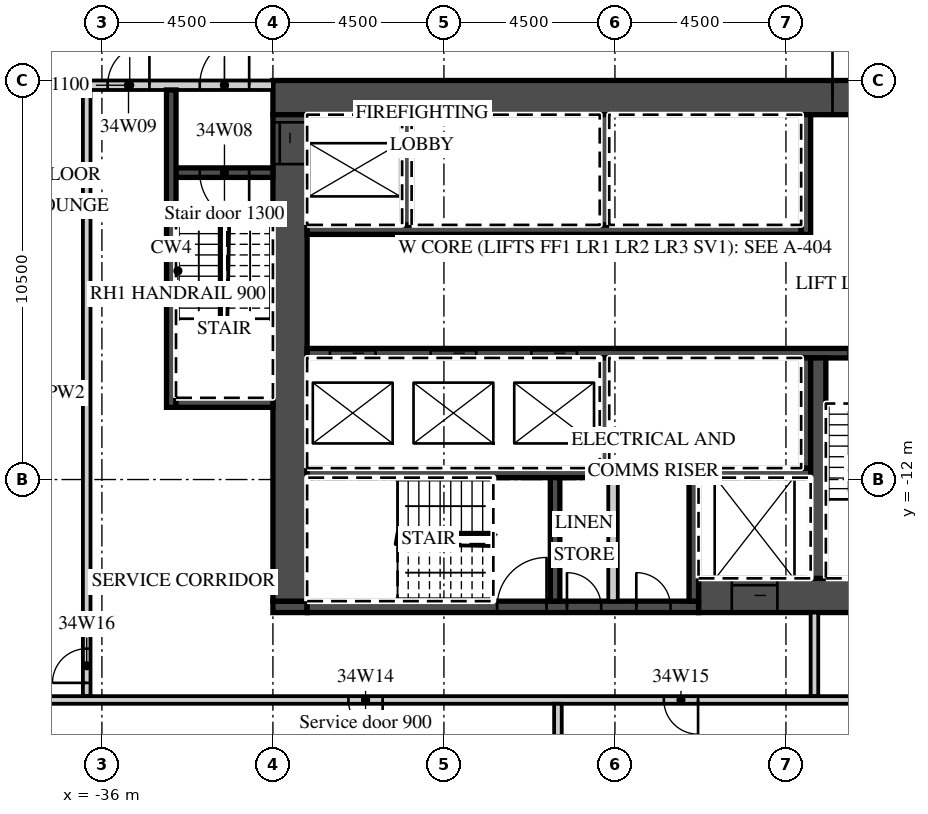
"""IFC4 building model, lengths in metres.
Left out: names, types, materials, properties, quantities, classifications, styles, units other than length and angle.
Written with IfcOpenShell. Run it as: python <this file> out.ifc"""

import sys

from ifc_helpers import new_model, si_unit, direction, frame, frame_2d, origin, place, context, subcontext, project, spatial, rectangle, extrude, element, fill, save


model = new_model("IFC4")
c1 = context("Model", 3, precision=1e-05, world=origin(), true_north=direction((0.0, 1.0)))
c2 = subcontext(c1, "Body", "Model", "MODEL_VIEW")
j1 = project(units=[si_unit("LENGTHUNIT", "METRE"), si_unit("PLANEANGLEUNIT", "RADIAN")], contexts=[c1])
p1 = place(None, origin())
s1 = spatial("IfcSite", under=j1, at=p1, CompositionType="ELEMENT")
p2 = place(p1, origin())
s2 = spatial("IfcBuilding", under=s1, at=p2, CompositionType="ELEMENT")
p3 = place(p2, frame((0.0, 0.0, 147.1)))
s3 = spatial("IfcBuildingStorey", under=s2, at=p3, CompositionType="ELEMENT", Elevation=147.1)
p4 = place(p3, frame((-40.753, 13.872, 0.0), z_axis=(0.0, 0.0, 1.0), x_axis=(0.095843327381, -0.995396431878, 0.0)))
e1 = element("IfcWall", 1, at=p4, inside=s3, PredefinedType="SOLIDWALL", context=c2, shape_type="SweptSolid", body=[
    extrude(rectangle(XDim=35.0, YDim=0.45, at=frame_2d((17.5, 0.0))), origin(), (0.0, 0.0, 1.0), 3.0),
])
p5 = place(p4, frame((4.277, 0.0, 0.45)))
e2 = element("IfcOpeningElement", 2, at=p5, cuts=e1, PredefinedType="OPENING", context=c2, shape_type="SweptSolid", body=[
    extrude(rectangle(XDim=3.3, YDim=2.25, at=frame_2d((1.65, 1.125))), frame((0.0, 0.235, 0.0), z_axis=(0.0, -1.0, 0.0), x_axis=(1.0, 0.0, 0.0)), (0.0, 0.0, 1.0), 0.47),
])
p6 = place(p4, frame((8.798, 0.0, 0.45)))
e3 = element("IfcOpeningElement", 3, at=p6, cuts=e1, PredefinedType="OPENING", context=c2, shape_type="SweptSolid", body=[
    extrude(rectangle(XDim=3.3, YDim=2.25, at=frame_2d((1.65, 1.125))), frame((0.0, 0.235, 0.0), z_axis=(0.0, -1.0, 0.0), x_axis=(1.0, 0.0, 0.0)), (0.0, 0.0, 1.0), 0.47),
])
p7 = place(p3, frame((-31.5, -1.95, 0.0), z_axis=(0.0, 0.0, 1.0), x_axis=(1.0, 0.0, 0.0)))
e4 = element("IfcWall", 4, at=p7, inside=s3, PredefinedType="SHEAR", context=c2, shape_type="SweptSolid", body=[
    extrude(rectangle(XDim=18.0, YDim=0.9, at=frame_2d((9.0, 0.0))), origin(), (0.0, 0.0, 1.0), 3.0),
])
p8 = place(p7, frame((14.725, 0.0, 0.0)))
e5 = element("IfcOpeningElement", 5, at=p8, cuts=e4, PredefinedType="OPENING", context=c2, shape_type="SweptSolid", body=[
    extrude(rectangle(XDim=1.8, YDim=2.1, at=frame_2d((0.9, 1.05))), frame((0.0, 0.46, 0.0), z_axis=(0.0, -1.0, 0.0), x_axis=(1.0, 0.0, 0.0)), (0.0, 0.0, 1.0), 0.92),
])
p9 = place(p3, frame((-20.3, -15.05, 0.0), z_axis=(0.0, 0.0, 1.0), x_axis=(1.0, 0.0, 0.0)))
e6 = element("IfcWall", 6, at=p9, inside=s3, PredefinedType="SHEAR", context=c2, shape_type="SweptSolid", body=[
    extrude(rectangle(XDim=6.8, YDim=0.9, at=frame_2d((3.4, 0.0))), origin(), (0.0, 0.0, 1.0), 3.0),
])
p10 = place(p9, frame((0.875, 0.0, 0.0)))
e7 = element("IfcOpeningElement", 7, at=p10, cuts=e6, PredefinedType="OPENING", context=c2, shape_type="SweptSolid", body=[
    extrude(rectangle(XDim=1.2, YDim=2.1, at=frame_2d((0.6, 1.05))), frame((0.0, 0.46, 0.0), z_axis=(0.0, -1.0, 0.0), x_axis=(1.0, 0.0, 0.0)), (0.0, 0.0, 1.0), 0.92),
])
p11 = place(p3, frame((-31.5, -15.35, 0.0), z_axis=(0.0, 0.0, 1.0), x_axis=(1.0, 0.0, 0.0)))
e8 = element("IfcWall", 8, at=p11, inside=s3, PredefinedType="SHEAR", context=c2, shape_type="SweptSolid", body=[
    extrude(rectangle(XDim=0.9, YDim=0.3, at=frame_2d((0.45, 0.0))), origin(), (0.0, 0.0, 1.0), 3.0),
])
p12 = place(p3, frame((-30.6, -15.35, 0.0), z_axis=(0.0, 0.0, 1.0), x_axis=(1.0, 0.0, 0.0)))
e9 = element("IfcWall", 9, at=p12, inside=s3, PredefinedType="SHEAR", context=c2, shape_type="SweptSolid", body=[
    extrude(rectangle(XDim=10.3, YDim=0.3, at=frame_2d((5.15, 0.0))), origin(), (0.0, 0.0, 1.0), 3.0),
])
p13 = place(p12, frame((5.0, 0.0, 0.0)))
e10 = element("IfcOpeningElement", 10, at=p13, cuts=e9, PredefinedType="OPENING", context=c2, shape_type="SweptSolid", body=[
    extrude(rectangle(XDim=1.3, YDim=2.1, at=frame_2d((0.65, 1.05))), frame((0.0, 0.16, 0.0), z_axis=(0.0, -1.0, 0.0), x_axis=(1.0, 0.0, 0.0)), (0.0, 0.0, 1.0), 0.32),
])
p14 = place(p12, frame((6.837, 0.0, 0.0)))
e11 = element("IfcOpeningElement", 11, at=p14, cuts=e9, PredefinedType="OPENING", context=c2, shape_type="SweptSolid", body=[
    extrude(rectangle(XDim=0.9, YDim=2.1, at=frame_2d((0.45, 1.05))), frame((0.0, 0.16, 0.0), z_axis=(0.0, -1.0, 0.0), x_axis=(1.0, 0.0, 0.0)), (0.0, 0.0, 1.0), 0.32),
])
p15 = place(p12, frame((8.663, 0.0, 0.0)))
e12 = element("IfcOpeningElement", 12, at=p15, cuts=e9, PredefinedType="OPENING", context=c2, shape_type="SweptSolid", body=[
    extrude(rectangle(XDim=0.9, YDim=2.1, at=frame_2d((0.45, 1.05))), frame((0.0, 0.16, 0.0), z_axis=(0.0, -1.0, 0.0), x_axis=(1.0, 0.0, 0.0)), (0.0, 0.0, 1.0), 0.32),
])
p16 = place(p3, frame((-31.05, -15.2, 0.0), z_axis=(0.0, 0.0, 1.0), x_axis=(0.0, 1.0, 0.0)))
e13 = element("IfcWall", 13, at=p16, inside=s3, PredefinedType="SHEAR", context=c2, shape_type="SweptSolid", body=[
    extrude(rectangle(XDim=12.8, YDim=0.9, at=frame_2d((6.4, 0.0))), origin(), (0.0, 0.0, 1.0), 3.0),
])
p17 = place(p16, frame((11.5, 0.0, 0.0)))
e14 = element("IfcOpeningElement", 14, at=p17, cuts=e13, PredefinedType="OPENING", context=c2, shape_type="SweptSolid", body=[
    extrude(rectangle(XDim=1.1, YDim=2.1, at=frame_2d((0.55, 1.05))), frame((0.0, 0.46, 0.0), z_axis=(0.0, -1.0, 0.0), x_axis=(1.0, 0.0, 0.0)), (0.0, 0.0, 1.0), 0.92),
])
p18 = place(p3, frame((-30.6, -5.425, 0.0), z_axis=(0.0, 0.0, 1.0), x_axis=(1.0, 0.0, 0.0)))
e15 = element("IfcWall", 15, at=p18, inside=s3, PredefinedType="SHEAR", context=c2, shape_type="SweptSolid", body=[
    extrude(rectangle(XDim=13.0, YDim=0.25, at=frame_2d((6.5, 0.0))), origin(), (0.0, 0.0, 1.0), 3.0),
])
p19 = place(p3, frame((-17.475, -5.55, 0.0), z_axis=(0.0, 0.0, 1.0), x_axis=(0.0, 1.0, 0.0)))
e16 = element("IfcWall", 16, at=p19, inside=s3, PredefinedType="SHEAR", context=c2, shape_type="SweptSolid", body=[
    extrude(rectangle(XDim=3.15, YDim=0.25, at=frame_2d((1.575, 0.0))), origin(), (0.0, 0.0, 1.0), 3.0),
])
for number, where, z_axis, x_axis in (
    (17, (-27.975, -5.3, 0.0), (0.0, 0.0, 1.0), (0.0, 1.0, 0.0)),
    (18, (-22.775, -5.3, 0.0), (0.0, 0.0, 1.0), (0.0, 1.0, 0.0)),
):
    element("IfcWall", number, at=place(p3, frame(where, z_axis=z_axis, x_axis=x_axis)), inside=s3, PredefinedType="SHEAR", context=c2, shape_type="SweptSolid", body=[
        extrude(rectangle(XDim=2.9, YDim=0.25, at=frame_2d((1.45, 0.0))), origin(), (0.0, 0.0, 1.0), 3.0),
    ])
p20 = place(p3, frame((-30.6, -8.675, 0.0), z_axis=(0.0, 0.0, 1.0), x_axis=(1.0, 0.0, 0.0)))
e19 = element("IfcWall", 19, at=p20, inside=s3, PredefinedType="SHEAR", context=c2, shape_type="SweptSolid", body=[
    extrude(rectangle(XDim=16.2, YDim=0.25, at=frame_2d((8.1, 0.0))), origin(), (0.0, 0.0, 1.0), 3.0),
])
p21 = place(p20, frame((0.6, 0.0, 0.0)))
e20 = element("IfcOpeningElement", 20, at=p21, cuts=e19, PredefinedType="OPENING", context=c2, shape_type="SweptSolid", body=[
    extrude(rectangle(XDim=1.2, YDim=2.1, at=frame_2d((0.6, 1.05))), frame((0.0, 0.135, 0.0), z_axis=(0.0, -1.0, 0.0), x_axis=(1.0, 0.0, 0.0)), (0.0, 0.0, 1.0), 0.27),
])
p22 = place(p20, frame((3.25, 0.0, 0.0)))
e21 = element("IfcOpeningElement", 21, at=p22, cuts=e19, PredefinedType="OPENING", context=c2, shape_type="SweptSolid", body=[
    extrude(rectangle(XDim=1.2, YDim=2.1, at=frame_2d((0.6, 1.05))), frame((0.0, 0.135, 0.0), z_axis=(0.0, -1.0, 0.0), x_axis=(1.0, 0.0, 0.0)), (0.0, 0.0, 1.0), 0.27),
])
p23 = place(p20, frame((5.9, 0.0, 0.0)))
e22 = element("IfcOpeningElement", 22, at=p23, cuts=e19, PredefinedType="OPENING", context=c2, shape_type="SweptSolid", body=[
    extrude(rectangle(XDim=1.2, YDim=2.1, at=frame_2d((0.6, 1.05))), frame((0.0, 0.135, 0.0), z_axis=(0.0, -1.0, 0.0), x_axis=(1.0, 0.0, 0.0)), (0.0, 0.0, 1.0), 0.27),
])
p24 = place(p20, frame((14.25, 0.0, 0.0)))
e23 = element("IfcOpeningElement", 23, at=p24, cuts=e19, PredefinedType="OPENING", context=c2, shape_type="SweptSolid", body=[
    extrude(rectangle(XDim=1.3, YDim=2.1, at=frame_2d((0.65, 1.05))), frame((0.0, 0.135, 0.0), z_axis=(0.0, -1.0, 0.0), x_axis=(1.0, 0.0, 0.0)), (0.0, 0.0, 1.0), 0.27),
])
p25 = place(p3, frame((-30.6, -11.825, 0.0), z_axis=(0.0, 0.0, 1.0), x_axis=(1.0, 0.0, 0.0)))
e24 = element("IfcWall", 24, at=p25, inside=s3, PredefinedType="SHEAR", context=c2, shape_type="SweptSolid", body=[
    extrude(rectangle(XDim=13.25, YDim=0.25, at=frame_2d((6.625, 0.0))), origin(), (0.0, 0.0, 1.0), 3.0),
])
for number, where, z_axis, x_axis in (
    (25, (-17.475, -11.7, 0.0), (0.0, 0.0, 1.0), (0.0, 1.0, 0.0)),
    (26, (-22.775, -11.7, 0.0), (0.0, 0.0, 1.0), (0.0, 1.0, 0.0)),
):
    element("IfcWall", number, at=place(p3, frame(where, z_axis=z_axis, x_axis=x_axis)), inside=s3, PredefinedType="SHEAR", context=c2, shape_type="SweptSolid", body=[
        extrude(rectangle(XDim=2.9, YDim=0.25, at=frame_2d((1.45, 0.0))), origin(), (0.0, 0.0, 1.0), 3.0),
    ])
p26 = place(p3, frame((-17.15, -14.6, 0.0), z_axis=(0.0, 0.0, 1.0), x_axis=(0.0, 1.0, 0.0)))
e27 = element("IfcWall", 27, at=p26, inside=s3, PredefinedType="SHEAR", context=c2, shape_type="SweptSolid", body=[
    extrude(rectangle(XDim=5.8, YDim=0.4, at=frame_2d((2.9, 0.0))), origin(), (0.0, 0.0, 1.0), 3.0),
])
for number, where, z_axis, x_axis in (
    (28, (-20.425, -15.2, 0.0), (0.0, 0.0, 1.0), (0.0, 1.0, 0.0)),
    (29, (-24.075, -15.2, 0.0), (0.0, 0.0, 1.0), (0.0, 1.0, 0.0)),
):
    element("IfcWall", number, at=place(p3, frame(where, z_axis=z_axis, x_axis=x_axis)), inside=s3, PredefinedType="SHEAR", context=c2, shape_type="SweptSolid", body=[
        extrude(rectangle(XDim=3.25, YDim=0.25, at=frame_2d((1.625, 0.0))), origin(), (0.0, 0.0, 1.0), 3.0),
    ])
p27 = place(p3, frame((-22.55, -15.2, 0.0), z_axis=(0.0, 0.0, 1.0), x_axis=(0.0, 1.0, 0.0)))
e30 = element("IfcWall", 30, at=p27, inside=s3, PredefinedType="PARTITIONING", context=c2, shape_type="SweptSolid", body=[
    extrude(rectangle(XDim=3.25, YDim=0.25, at=frame_2d((1.625, 0.0))), origin(), (0.0, 0.0, 1.0), 3.0),
])
p28 = place(p3, frame((-39.035, -1.625, 0.0), z_axis=(0.0, 0.0, 1.0), x_axis=(1.0, 0.0, 0.0)))
e31 = element("IfcWall", 31, at=p28, inside=s3, PredefinedType="PARTITIONING", context=c2, shape_type="SweptSolid", body=[
    extrude(rectangle(XDim=7.535, YDim=0.25, at=frame_2d((3.768, 0.0))), origin(), (0.0, 0.0, 1.0), 3.0),
])
p29 = place(p28, frame((5.61, 0.0, 0.0)))
e32 = element("IfcOpeningElement", 32, at=p29, cuts=e31, PredefinedType="OPENING", context=c2, shape_type="SweptSolid", body=[
    extrude(rectangle(XDim=1.3, YDim=2.1, at=frame_2d((0.65, 1.05))), frame((0.0, 0.135, 0.0), z_axis=(0.0, -1.0, 0.0), x_axis=(1.0, 0.0, 0.0)), (0.0, 0.0, 1.0), 0.27),
])
p30 = place(p28, frame((3.185, 0.0, 0.0)))
e33 = element("IfcOpeningElement", 33, at=p30, cuts=e31, PredefinedType="OPENING", context=c2, shape_type="SweptSolid", body=[
    extrude(rectangle(XDim=1.1, YDim=2.1, at=frame_2d((0.55, 1.05))), frame((0.0, 0.135, 0.0), z_axis=(0.0, -1.0, 0.0), x_axis=(1.0, 0.0, 0.0)), (0.0, 0.0, 1.0), 0.27),
])
p31 = place(p3, frame((-34.05, -3.925, 0.0), z_axis=(0.0, 0.0, 1.0), x_axis=(1.0, 0.0, 0.0)))
e34 = element("IfcWall", 34, at=p31, inside=s3, PredefinedType="SHEAR", context=c2, shape_type="SweptSolid", body=[
    extrude(rectangle(XDim=2.55, YDim=0.25, at=frame_2d((1.275, 0.0))), origin(), (0.0, 0.0, 1.0), 3.0),
])
p32 = place(p31, frame((0.625, 0.0, 0.0)))
e35 = element("IfcOpeningElement", 35, at=p32, cuts=e34, PredefinedType="OPENING", context=c2, shape_type="SweptSolid", body=[
    extrude(rectangle(XDim=1.3, YDim=2.1, at=frame_2d((0.65, 1.05))), frame((0.0, 0.135, 0.0), z_axis=(0.0, -1.0, 0.0), x_axis=(1.0, 0.0, 0.0)), (0.0, 0.0, 1.0), 0.27),
])
p33 = place(p3, frame((-34.175, -10.1, 0.0), z_axis=(0.0, 0.0, 1.0), x_axis=(0.0, 1.0, 0.0)))
e36 = element("IfcWall", 36, at=p33, inside=s3, PredefinedType="SHEAR", context=c2, shape_type="SweptSolid", body=[
    extrude(rectangle(XDim=8.35, YDim=0.25, at=frame_2d((4.175, 0.0))), origin(), (0.0, 0.0, 1.0), 3.0),
])
p34 = place(p3, frame((-34.05, -9.975, 0.0), z_axis=(0.0, 0.0, 1.0), x_axis=(1.0, 0.0, 0.0)))
e37 = element("IfcWall", 37, at=p34, inside=s3, PredefinedType="SHEAR", context=c2, shape_type="SweptSolid", body=[
    extrude(rectangle(XDim=2.55, YDim=0.25, at=frame_2d((1.275, 0.0))), origin(), (0.0, 0.0, 1.0), 3.0),
])
p35 = place(p3, frame((-17.25, -17.7, 0.0), z_axis=(0.0, 0.0, 1.0), x_axis=(0.0, 1.0, 0.0)))
e38 = element("IfcWall", 38, at=p35, inside=s3, PredefinedType="PARTITIONING", context=c2, shape_type="SweptSolid", body=[
    extrude(rectangle(XDim=2.2, YDim=0.2, at=frame_2d((1.1, 0.0))), origin(), (0.0, 0.0, 1.0), 3.0),
])
p36 = place(p3, frame((-36.4, -17.7, 0.0), z_axis=(0.0, 0.0, 1.0), x_axis=(0.0, 1.0, 0.0)))
e39 = element("IfcWall", 39, at=p36, inside=s3, PredefinedType="PARTITIONING", context=c2, shape_type="SweptSolid", body=[
    extrude(rectangle(XDim=15.95, YDim=0.2, at=frame_2d((7.975, 0.0))), origin(), (0.0, 0.0, 1.0), 3.0),
])
p37 = place(p36, frame((0.35, 0.0, 0.0)))
e40 = element("IfcOpeningElement", 40, at=p37, cuts=e39, PredefinedType="OPENING", context=c2, shape_type="SweptSolid", body=[
    extrude(rectangle(XDim=0.9, YDim=2.1, at=frame_2d((0.45, 1.05))), frame((0.0, 0.11, 0.0), z_axis=(0.0, -1.0, 0.0), x_axis=(1.0, 0.0, 0.0)), (0.0, 0.0, 1.0), 0.22),
])
p38 = place(p3, frame((-37.477, -17.8, 0.0), z_axis=(0.0, 0.0, 1.0), x_axis=(1.0, 0.0, 0.0)))
e41 = element("IfcWall", 41, at=p38, inside=s3, PredefinedType="PARTITIONING", context=c2, shape_type="SweptSolid", body=[
    extrude(rectangle(XDim=23.877, YDim=0.2, at=frame_2d((11.938, 0.0))), origin(), (0.0, 0.0, 1.0), 3.0),
])
p39 = place(p38, frame((7.965, 0.0, 0.0)))
e42 = element("IfcOpeningElement", 42, at=p39, cuts=e41, PredefinedType="OPENING", context=c2, shape_type="SweptSolid", body=[
    extrude(rectangle(XDim=0.9, YDim=2.1, at=frame_2d((0.45, 1.05))), frame((0.0, 0.11, 0.0), z_axis=(0.0, -1.0, 0.0), x_axis=(1.0, 0.0, 0.0)), (0.0, 0.0, 1.0), 0.22),
])
p40 = place(p38, frame((16.265, 0.0, 0.0)))
e43 = element("IfcOpeningElement", 43, at=p40, cuts=e41, PredefinedType="OPENING", context=c2, shape_type="SweptSolid", body=[
    extrude(rectangle(XDim=0.9, YDim=2.1, at=frame_2d((0.45, 1.05))), frame((0.0, 0.11, 0.0), z_axis=(0.0, -1.0, 0.0), x_axis=(1.0, 0.0, 0.0)), (0.0, 0.0, 1.0), 0.22),
])
p41 = place(p3, frame((-24.0, -23.244, 0.0), z_axis=(0.0, 0.0, 1.0), x_axis=(0.0, 1.0, 0.0)))
e44 = element("IfcWall", 44, at=p41, inside=s3, PredefinedType="PARTITIONING", context=c2, shape_type="SweptSolid", body=[
    extrude(rectangle(XDim=5.344, YDim=0.2, at=frame_2d((2.672, 0.0))), origin(), (0.0, 0.0, 1.0), 3.0),
])
p42 = place(p21, origin())
e45 = element("IfcDoor", 45, at=p42, inside=s3, OperationType="SLIDING_TO_LEFT", PredefinedType="DOOR", context=c2, shape_type="SweptSolid", body=[
    extrude(rectangle(XDim=1.2, YDim=2.1, at=frame_2d((0.6, 1.05))), frame((0.0, 0.025, 0.0), z_axis=(0.0, -1.0, 0.0), x_axis=(1.0, 0.0, 0.0)), (0.0, 0.0, 1.0), 0.05),
])
fill(e20, e45)
p43 = place(p22, origin())
e46 = element("IfcDoor", 46, at=p43, inside=s3, OperationType="SLIDING_TO_RIGHT", PredefinedType="DOOR", context=c2, shape_type="SweptSolid", body=[
    extrude(rectangle(XDim=1.2, YDim=2.1, at=frame_2d((0.6, 1.05))), frame((0.0, 0.025, 0.0), z_axis=(0.0, -1.0, 0.0), x_axis=(1.0, 0.0, 0.0)), (0.0, 0.0, 1.0), 0.05),
])
fill(e21, e46)
p44 = place(p23, origin())
e47 = element("IfcDoor", 47, at=p44, inside=s3, OperationType="SLIDING_TO_RIGHT", PredefinedType="DOOR", context=c2, shape_type="SweptSolid", body=[
    extrude(rectangle(XDim=1.2, YDim=2.1, at=frame_2d((0.6, 1.05))), frame((0.0, 0.025, 0.0), z_axis=(0.0, -1.0, 0.0), x_axis=(1.0, 0.0, 0.0)), (0.0, 0.0, 1.0), 0.05),
])
fill(e22, e47)
p45 = place(p10, origin())
e48 = element("IfcDoor", 48, at=p45, inside=s3, OperationType="SLIDING_TO_LEFT", PredefinedType="DOOR", context=c2, shape_type="SweptSolid", body=[
    extrude(rectangle(XDim=1.2, YDim=2.1, at=frame_2d((0.6, 1.05))), frame((0.0, 0.025, 0.0), z_axis=(0.0, -1.0, 0.0), x_axis=(1.0, 0.0, 0.0)), (0.0, 0.0, 1.0), 0.05),
])
fill(e7, e48)
p46 = place(p17, origin())
e49 = element("IfcDoor", 49, at=p46, inside=s3, OperationType="SLIDING_TO_RIGHT", PredefinedType="DOOR", context=c2, shape_type="SweptSolid", body=[
    extrude(rectangle(XDim=1.1, YDim=2.1, at=frame_2d((0.55, 1.05))), frame((0.0, 0.025, 0.0), z_axis=(0.0, -1.0, 0.0), x_axis=(1.0, 0.0, 0.0)), (0.0, 0.0, 1.0), 0.05),
])
fill(e14, e49)
p47 = place(p8, origin())
e50 = element("IfcDoor", 50, at=p47, inside=s3, OperationType="DOUBLE_DOOR_DOUBLE_SWING", PredefinedType="DOOR", context=c2, shape_type="SweptSolid", body=[
    extrude(rectangle(XDim=1.8, YDim=2.1, at=frame_2d((0.9, 1.05))), frame((0.0, 0.025, 0.0), z_axis=(0.0, -1.0, 0.0), x_axis=(1.0, 0.0, 0.0)), (0.0, 0.0, 1.0), 0.05),
])
fill(e5, e50)
p48 = place(p29, origin())
e51 = element("IfcDoor", 51, at=p48, inside=s3, OperationType="SINGLE_SWING_RIGHT", PredefinedType="DOOR", context=c2, shape_type="SweptSolid", body=[
    extrude(rectangle(XDim=1.3, YDim=2.1, at=frame_2d((0.65, 1.05))), frame((0.0, 0.025, 0.0), z_axis=(0.0, -1.0, 0.0), x_axis=(1.0, 0.0, 0.0)), (0.0, 0.0, 1.0), 0.05),
])
fill(e32, e51)
p49 = place(p32, origin())
e52 = element("IfcDoor", 52, at=p49, inside=s3, OperationType="SINGLE_SWING_RIGHT", PredefinedType="DOOR", context=c2, shape_type="SweptSolid", body=[
    extrude(rectangle(XDim=1.3, YDim=2.1, at=frame_2d((0.65, 1.05))), frame((0.0, 0.025, 0.0), z_axis=(0.0, -1.0, 0.0), x_axis=(1.0, 0.0, 0.0)), (0.0, 0.0, 1.0), 0.05),
])
fill(e35, e52)
p50 = place(p30, origin())
e53 = element("IfcDoor", 53, at=p50, inside=s3, OperationType="SINGLE_SWING_RIGHT", PredefinedType="DOOR", context=c2, shape_type="SweptSolid", body=[
    extrude(rectangle(XDim=1.1, YDim=2.1, at=frame_2d((0.55, 1.05))), frame((0.0, 0.025, 0.0), z_axis=(0.0, -1.0, 0.0), x_axis=(1.0, 0.0, 0.0)), (0.0, 0.0, 1.0), 0.05),
])
fill(e33, e53)
p51 = place(p24, origin())
e54 = element("IfcDoor", 54, at=p51, inside=s3, OperationType="SINGLE_SWING_RIGHT", PredefinedType="DOOR", context=c2, shape_type="SweptSolid", body=[
    extrude(rectangle(XDim=1.3, YDim=2.1, at=frame_2d((0.65, 1.05))), frame((0.0, 0.025, 0.0), z_axis=(0.0, -1.0, 0.0), x_axis=(1.0, 0.0, 0.0)), (0.0, 0.0, 1.0), 0.05),
])
fill(e23, e54)
p52 = place(p13, origin())
e55 = element("IfcDoor", 55, at=p52, inside=s3, OperationType="SINGLE_SWING_RIGHT", PredefinedType="DOOR", context=c2, shape_type="SweptSolid", body=[
    extrude(rectangle(XDim=1.3, YDim=2.1, at=frame_2d((0.65, 1.05))), frame((0.0, 0.025, 0.0), z_axis=(0.0, -1.0, 0.0), x_axis=(1.0, 0.0, 0.0)), (0.0, 0.0, 1.0), 0.05),
])
fill(e10, e55)
p53 = place(p14, origin())
e56 = element("IfcDoor", 56, at=p53, inside=s3, OperationType="SINGLE_SWING_LEFT", PredefinedType="DOOR", context=c2, shape_type="SweptSolid", body=[
    extrude(rectangle(XDim=0.9, YDim=2.1, at=frame_2d((0.45, 1.05))), frame((0.0, 0.025, 0.0), z_axis=(0.0, -1.0, 0.0), x_axis=(1.0, 0.0, 0.0)), (0.0, 0.0, 1.0), 0.05),
])
fill(e11, e56)
p54 = place(p15, origin())
e57 = element("IfcDoor", 57, at=p54, inside=s3, OperationType="SINGLE_SWING_LEFT", PredefinedType="DOOR", context=c2, shape_type="SweptSolid", body=[
    extrude(rectangle(XDim=0.9, YDim=2.1, at=frame_2d((0.45, 1.05))), frame((0.0, 0.025, 0.0), z_axis=(0.0, -1.0, 0.0), x_axis=(1.0, 0.0, 0.0)), (0.0, 0.0, 1.0), 0.05),
])
fill(e12, e57)
p55 = place(p39, origin())
e58 = element("IfcDoor", 58, at=p55, inside=s3, OperationType="SINGLE_SWING_RIGHT", PredefinedType="DOOR", context=c2, shape_type="SweptSolid", body=[
    extrude(rectangle(XDim=0.9, YDim=2.1, at=frame_2d((0.45, 1.05))), frame((0.0, 0.025, 0.0), z_axis=(0.0, -1.0, 0.0), x_axis=(1.0, 0.0, 0.0)), (0.0, 0.0, 1.0), 0.05),
])
fill(e42, e58)
p56 = place(p40, origin())
e59 = element("IfcDoor", 59, at=p56, inside=s3, OperationType="SINGLE_SWING_RIGHT", PredefinedType="DOOR", context=c2, shape_type="SweptSolid", body=[
    extrude(rectangle(XDim=0.9, YDim=2.1, at=frame_2d((0.45, 1.05))), frame((0.0, 0.025, 0.0), z_axis=(0.0, -1.0, 0.0), x_axis=(1.0, 0.0, 0.0)), (0.0, 0.0, 1.0), 0.05),
])
fill(e43, e59)
p57 = place(p37, origin())
e60 = element("IfcDoor", 60, at=p57, inside=s3, OperationType="SINGLE_SWING_LEFT", PredefinedType="DOOR", context=c2, shape_type="SweptSolid", body=[
    extrude(rectangle(XDim=0.9, YDim=2.1, at=frame_2d((0.45, 1.05))), frame((0.0, 0.025, 0.0), z_axis=(0.0, -1.0, 0.0), x_axis=(1.0, 0.0, 0.0)), (0.0, 0.0, 1.0), 0.05),
])
fill(e40, e60)
save(model, sys.argv[1])
